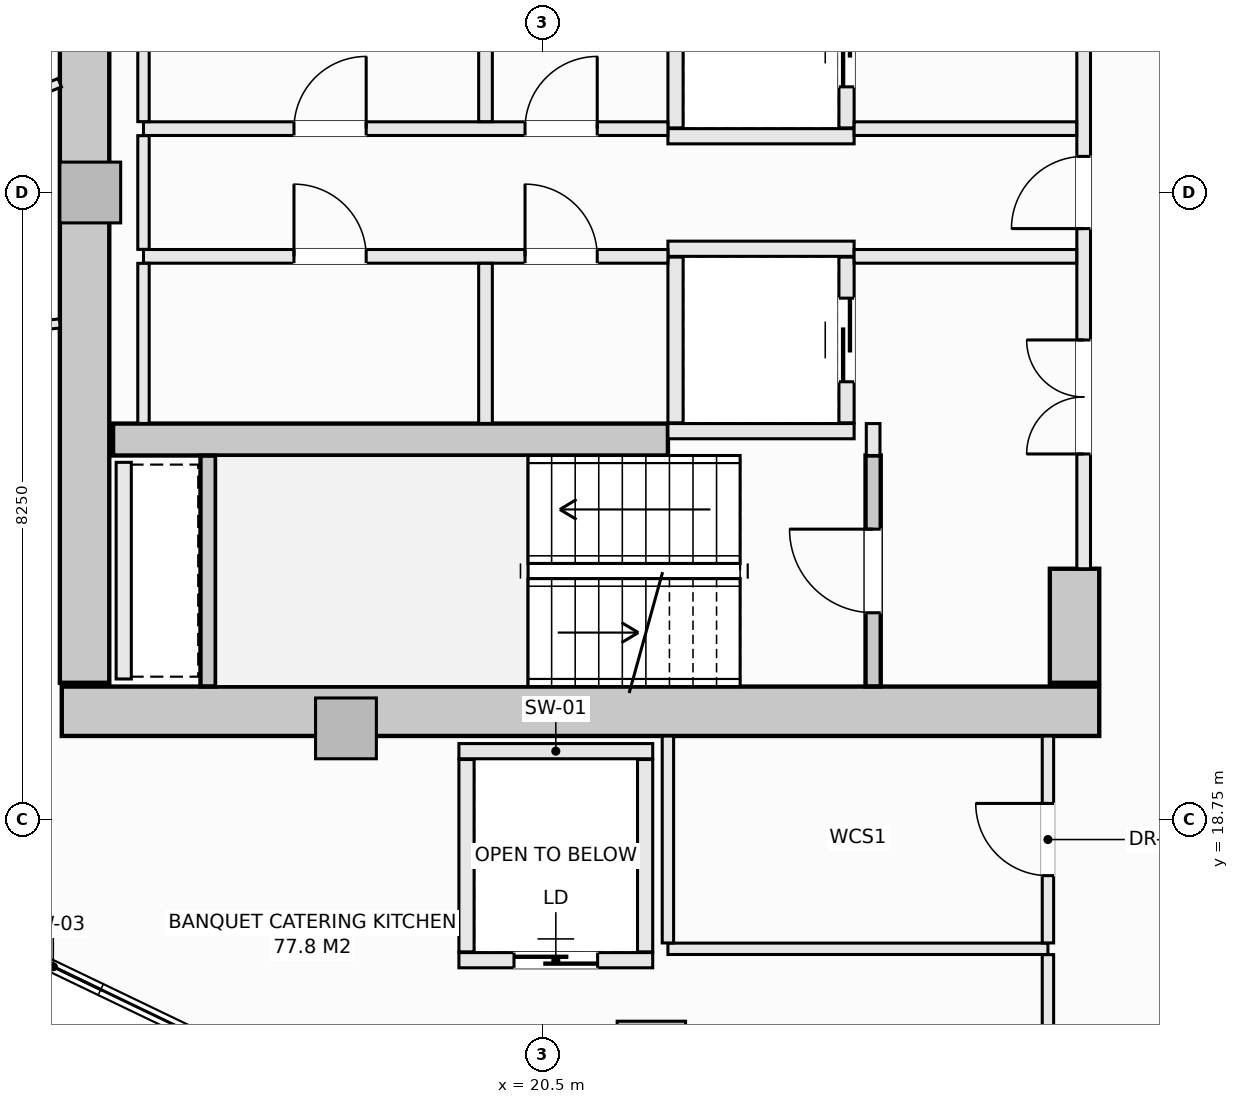
"""IFC4 building model, lengths in metres.
Left out: names, types, materials, properties, quantities, classifications, styles, units other than length and angle.
Written with IfcOpenShell. Run it as: python <this file> out.ifc"""

import sys

from ifc_helpers import new_model, si_unit, direction, frame, frame_2d, origin, origin_2d, place, context, subcontext, project, spatial, rectangle, extrude, element, fill, save


model = new_model("IFC4")
c1 = context("Model", 3, precision=1e-05, world=origin(), true_north=direction((0.0, 1.0)))
c2 = subcontext(c1, "Body", "Model", "MODEL_VIEW")
j1 = project(units=[si_unit("LENGTHUNIT", "METRE"), si_unit("PLANEANGLEUNIT", "RADIAN")], contexts=[c1])
p1 = place(None, origin())
s1 = spatial("IfcSite", under=j1, at=p1, CompositionType="ELEMENT")
p2 = place(p1, origin())
s2 = spatial("IfcBuilding", under=s1, at=p2, CompositionType="ELEMENT")
p3 = place(p2, frame((0.0, 0.0, 149.5)))
s3 = spatial("IfcBuildingStorey", under=s2, at=p3, CompositionType="ELEMENT", Elevation=149.5)
p4 = place(p3, frame((14.175, 20.175, -0.27), z_axis=(0.0, 0.0, 1.0), x_axis=(1.0, 0.0, 0.0)))
e1 = element("IfcWall", 1, at=p4, inside=s3, PredefinedType="SHEAR", context=c2, shape_type="SweptSolid", body=[
    extrude(rectangle(XDim=13.65, YDim=0.65, at=frame_2d((6.825, 0.0))), origin(), (0.0, 0.0, 1.0), 3.4),
])
p5 = place(p3, frame((14.475, 20.55, -0.27), z_axis=(0.0, 0.0, 1.0), x_axis=(0.0, 1.0, 0.0)))
e2 = element("IfcWall", 2, at=p5, inside=s3, PredefinedType="SHEAR", context=c2, shape_type="SweptSolid", body=[
    extrude(rectangle(XDim=12.9, YDim=0.65, at=frame_2d((6.45, 0.0))), origin(), (0.0, 0.0, 1.0), 3.4),
])
p6 = place(p3, frame((27.5, 20.55, -0.27), z_axis=(0.0, 0.0, 1.0), x_axis=(0.0, 1.0, 0.0)))
e3 = element("IfcWall", 3, at=p6, inside=s3, PredefinedType="SHEAR", context=c2, shape_type="SweptSolid", body=[
    extrude(rectangle(XDim=1.5, YDim=0.65, at=frame_2d((0.75, 0.0))), origin(), (0.0, 0.0, 1.0), 3.4),
])
p7 = place(p3, frame((14.85, 23.75, -0.27), z_axis=(0.0, 0.0, 1.0), x_axis=(1.0, 0.0, 0.0)))
e4 = element("IfcWall", 4, at=p7, inside=s3, PredefinedType="SHEAR", context=c2, shape_type="SweptSolid", body=[
    extrude(rectangle(XDim=7.3, YDim=0.42, at=frame_2d((3.65, 0.0))), origin(), (0.0, 0.0, 1.0), 3.4),
])
p8 = place(p3, frame((21.932, 15.648, -0.27), z_axis=(0.0, 0.0, 1.0), x_axis=(1.0, 0.0, 0.0)))
e5 = element("IfcColumn", 5, at=p8, inside=s3, PredefinedType="COLUMN", context=c2, shape_type="SweptSolid", body=[
    extrude(rectangle(XDim=0.9, YDim=0.9, at=origin_2d()), origin(), (0.0, 0.0, 1.0), 3.4),
])
for number, where, z_axis, x_axis in (
    (6, (14.55, 27.0, -0.27), (0.0, 0.0, 1.0), (1.0, 0.0, 0.0)),
    (7, (17.914, 19.95, -0.27), (0.0, 0.0, 1.0), (1.0, 0.0, 0.0)),
):
    element("IfcColumn", number, at=place(p3, frame(where, z_axis=z_axis, x_axis=x_axis)), inside=s3, PredefinedType="PILASTER", context=c2, shape_type="SweptSolid", body=[
        extrude(rectangle(XDim=0.8, YDim=0.8, at=origin_2d()), origin(), (0.0, 0.0, 1.0), 3.4),
    ])
p9 = place(p3, frame((24.85, 20.502, -0.27), z_axis=(0.0, 0.0, 1.0), x_axis=(0.0, 1.0, 0.0)))
e8 = element("IfcWall", 8, at=p9, inside=s3, PredefinedType="SHEAR", context=c2, shape_type="SweptSolid", body=[
    extrude(rectangle(XDim=3.038, YDim=0.2, at=frame_2d((1.519, 0.0))), origin(), (0.0, 0.0, 1.0), 3.4),
])
p10 = place(p9, frame((0.969, 0.0, 0.27)))
e9 = element("IfcOpeningElement", 9, at=p10, cuts=e8, PredefinedType="OPENING", context=c2, shape_type="SweptSolid", body=[
    extrude(rectangle(XDim=1.1, YDim=2.15, at=frame_2d((0.55, 1.075))), frame((0.0, 0.11, 0.0), z_axis=(0.0, -1.0, 0.0), x_axis=(1.0, 0.0, 0.0)), (0.0, 0.0, 1.0), 0.22),
])
p11 = place(p3, frame((16.1, 20.502, -0.27), z_axis=(0.0, 0.0, 1.0), x_axis=(0.0, 1.0, 0.0)))
e10 = element("IfcWall", 10, at=p11, inside=s3, PredefinedType="SHEAR", context=c2, shape_type="SweptSolid", body=[
    extrude(rectangle(XDim=3.036, YDim=0.2, at=frame_2d((1.518, 0.0))), origin(), (0.0, 0.0, 1.0), 3.4),
])
p12 = place(p3, frame((22.15, 27.74, 0.0), z_axis=(0.0, 0.0, 1.0), x_axis=(1.0, 0.0, 0.0)))
e11 = element("IfcWall", 11, at=p12, inside=s3, PredefinedType="SOLIDWALL", context=c2, shape_type="SweptSolid", body=[
    extrude(rectangle(XDim=2.45, YDim=0.2, at=frame_2d((1.225, 0.0))), origin(), (0.0, 0.0, 1.0), 3.13),
])
p13 = place(p3, frame((22.25, 27.85, 0.0), z_axis=(0.0, 0.0, 1.0), x_axis=(0.0, 1.0, 0.0)))
e12 = element("IfcWall", 12, at=p13, inside=s3, PredefinedType="SOLIDWALL", context=c2, shape_type="SweptSolid", body=[
    extrude(rectangle(XDim=2.18, YDim=0.2, at=frame_2d((1.09, 0.0))), origin(), (0.0, 0.0, 1.0), 3.13),
])
p14 = place(p3, frame((24.5, 27.85, 0.0), z_axis=(0.0, 0.0, 1.0), x_axis=(0.0, 1.0, 0.0)))
e13 = element("IfcWall", 13, at=p14, inside=s3, PredefinedType="SOLIDWALL", context=c2, shape_type="SweptSolid", body=[
    extrude(rectangle(XDim=2.18, YDim=0.2, at=frame_2d((1.09, 0.0))), origin(), (0.0, 0.0, 1.0), 3.13),
])
p15 = place(p14, frame((0.54, 0.0, 0.0)))
e14 = element("IfcOpeningElement", 14, at=p15, cuts=e13, PredefinedType="OPENING", context=c2, shape_type="SweptSolid", body=[
    extrude(rectangle(XDim=1.1, YDim=2.2, at=frame_2d((0.55, 1.1))), frame((0.0, 0.11, 0.0), z_axis=(0.0, -1.0, 0.0), x_axis=(1.0, 0.0, 0.0)), (0.0, 0.0, 1.0), 0.22),
])
for number, where, z_axis, x_axis in (
    (15, (22.15, 26.26, 0.0), (0.0, 0.0, 1.0), (1.0, 0.0, 0.0)),
    (16, (22.15, 23.86, 0.0), (0.0, 0.0, 1.0), (1.0, 0.0, 0.0)),
):
    element("IfcWall", number, at=place(p3, frame(where, z_axis=z_axis, x_axis=x_axis)), inside=s3, PredefinedType="SOLIDWALL", context=c2, shape_type="SweptSolid", body=[
        extrude(rectangle(XDim=2.45, YDim=0.2, at=frame_2d((1.225, 0.0))), origin(), (0.0, 0.0, 1.0), 3.13),
    ])
p16 = place(p3, frame((22.25, 23.97, 0.0), z_axis=(0.0, 0.0, 1.0), x_axis=(0.0, 1.0, 0.0)))
e17 = element("IfcWall", 17, at=p16, inside=s3, PredefinedType="SOLIDWALL", context=c2, shape_type="SweptSolid", body=[
    extrude(rectangle(XDim=2.18, YDim=0.2, at=frame_2d((1.09, 0.0))), origin(), (0.0, 0.0, 1.0), 3.13),
])
p17 = place(p3, frame((24.5, 23.97, 0.0), z_axis=(0.0, 0.0, 1.0), x_axis=(0.0, 1.0, 0.0)))
e18 = element("IfcWall", 18, at=p17, inside=s3, PredefinedType="SOLIDWALL", context=c2, shape_type="SweptSolid", body=[
    extrude(rectangle(XDim=2.18, YDim=0.2, at=frame_2d((1.09, 0.0))), origin(), (0.0, 0.0, 1.0), 3.13),
])
p18 = place(p17, frame((0.54, 0.0, 0.0)))
e19 = element("IfcOpeningElement", 19, at=p18, cuts=e18, PredefinedType="OPENING", context=c2, shape_type="SweptSolid", body=[
    extrude(rectangle(XDim=1.1, YDim=2.2, at=frame_2d((0.55, 1.1))), frame((0.0, 0.11, 0.0), z_axis=(0.0, -1.0, 0.0), x_axis=(1.0, 0.0, 0.0)), (0.0, 0.0, 1.0), 0.22),
])
p19 = place(p3, frame((19.4, 19.65, 0.0), z_axis=(0.0, 0.0, 1.0), x_axis=(1.0, 0.0, 0.0)))
e20 = element("IfcWall", 20, at=p19, inside=s3, PredefinedType="SOLIDWALL", context=c2, shape_type="SweptSolid", body=[
    extrude(rectangle(XDim=2.55, YDim=0.2, at=frame_2d((1.275, 0.0))), origin(), (0.0, 0.0, 1.0), 3.13),
])
p20 = place(p3, frame((19.4, 16.9, 0.0), z_axis=(0.0, 0.0, 1.0), x_axis=(1.0, 0.0, 0.0)))
e21 = element("IfcWall", 21, at=p20, inside=s3, PredefinedType="SOLIDWALL", context=c2, shape_type="SweptSolid", body=[
    extrude(rectangle(XDim=2.55, YDim=0.2, at=frame_2d((1.275, 0.0))), origin(), (0.0, 0.0, 1.0), 3.13),
])
p21 = place(p20, frame((0.725, 0.0, 0.0)))
e22 = element("IfcOpeningElement", 22, at=p21, cuts=e21, PredefinedType="OPENING", context=c2, shape_type="SweptSolid", body=[
    extrude(rectangle(XDim=1.1, YDim=2.2, at=frame_2d((0.55, 1.1))), frame((0.0, 0.11, 0.0), z_axis=(0.0, -1.0, 0.0), x_axis=(1.0, 0.0, 0.0)), (0.0, 0.0, 1.0), 0.22),
])
for number, where, z_axis, x_axis in (
    (23, (19.5, 17.01, 0.0), (0.0, 0.0, 1.0), (0.0, 1.0, 0.0)),
    (24, (21.85, 17.01, 0.0), (0.0, 0.0, 1.0), (0.0, 1.0, 0.0)),
):
    element("IfcWall", number, at=place(p3, frame(where, z_axis=z_axis, x_axis=x_axis)), inside=s3, PredefinedType="SOLIDWALL", context=c2, shape_type="SweptSolid", body=[
        extrude(rectangle(XDim=2.53, YDim=0.2, at=frame_2d((1.265, 0.0))), origin(), (0.0, 0.0, 1.0), 3.13),
    ])
p22 = place(p3, frame((14.99, 20.6, 0.0), z_axis=(0.0, 0.0, 1.0), x_axis=(0.0, 1.0, 0.0)))
e25 = element("IfcWall", 25, at=p22, inside=s3, PredefinedType="SOLIDWALL", context=c2, shape_type="SweptSolid", body=[
    extrude(rectangle(XDim=2.85, YDim=0.2, at=frame_2d((1.425, 0.0))), origin(), (0.0, 0.0, 1.0), 3.13),
])
p23 = place(p3, frame((24.85, 23.54, 0.0), z_axis=(0.0, 0.0, 1.0), x_axis=(0.0, 1.0, 0.0)))
e26 = element("IfcWall", 26, at=p23, inside=s3, PredefinedType="SOLIDWALL", context=c2, shape_type="SweptSolid", body=[
    extrude(rectangle(XDim=0.42, YDim=0.18, at=frame_2d((0.21, 0.0))), origin(), (0.0, 0.0, 1.0), 3.13),
])
p24 = place(p3, frame((27.62, 22.05, 0.0), z_axis=(0.0, 0.0, 1.0), x_axis=(0.0, 1.0, 0.0)))
e27 = element("IfcWall", 27, at=p24, inside=s3, PredefinedType="SOLIDWALL", context=c2, shape_type="SweptSolid", body=[
    extrude(rectangle(XDim=9.9, YDim=0.18, at=frame_2d((4.95, 0.0))), origin(), (0.0, 0.0, 1.0), 3.13),
])
p25 = place(p24, frame((4.475, 0.0, 0.0)))
e28 = element("IfcOpeningElement", 28, at=p25, cuts=e27, PredefinedType="OPENING", context=c2, shape_type="SweptSolid", body=[
    extrude(rectangle(XDim=0.95, YDim=2.1, at=frame_2d((0.475, 1.05))), frame((0.0, 0.1, 0.0), z_axis=(0.0, -1.0, 0.0), x_axis=(1.0, 0.0, 0.0)), (0.0, 0.0, 1.0), 0.2),
])
p26 = place(p24, frame((6.89, 0.0, 0.0)))
e29 = element("IfcOpeningElement", 29, at=p26, cuts=e27, PredefinedType="OPENING", context=c2, shape_type="SweptSolid", body=[
    extrude(rectangle(XDim=1.5, YDim=2.2, at=frame_2d((0.75, 1.1))), frame((0.0, 0.1, 0.0), z_axis=(0.0, -1.0, 0.0), x_axis=(1.0, 0.0, 0.0)), (0.0, 0.0, 1.0), 0.2),
])
p27 = place(p24, frame((1.51, 0.0, 0.0)))
e30 = element("IfcOpeningElement", 30, at=p27, cuts=e27, PredefinedType="OPENING", context=c2, shape_type="SweptSolid", body=[
    extrude(rectangle(XDim=1.5, YDim=2.2, at=frame_2d((0.75, 1.1))), frame((0.0, 0.1, 0.0), z_axis=(0.0, -1.0, 0.0), x_axis=(1.0, 0.0, 0.0)), (0.0, 0.0, 1.0), 0.2),
])
p28 = place(p3, frame((15.25, 27.84, 0.0), z_axis=(0.0, 0.0, 1.0), x_axis=(1.0, 0.0, 0.0)))
e31 = element("IfcWall", 31, at=p28, inside=s3, PredefinedType="SOLIDWALL", context=c2, shape_type="SweptSolid", body=[
    extrude(rectangle(XDim=6.9, YDim=0.18, at=frame_2d((3.45, 0.0))), origin(), (0.0, 0.0, 1.0), 3.13),
])
p29 = place(p28, frame((5.02, 0.0, 0.0)))
e32 = element("IfcOpeningElement", 32, at=p29, cuts=e31, PredefinedType="OPENING", context=c2, shape_type="SweptSolid", body=[
    extrude(rectangle(XDim=0.95, YDim=2.1, at=frame_2d((0.475, 1.05))), frame((0.0, 0.1, 0.0), z_axis=(0.0, -1.0, 0.0), x_axis=(1.0, 0.0, 0.0)), (0.0, 0.0, 1.0), 0.2),
])
p30 = place(p28, frame((1.98, 0.0, 0.0)))
e33 = element("IfcOpeningElement", 33, at=p30, cuts=e31, PredefinedType="OPENING", context=c2, shape_type="SweptSolid", body=[
    extrude(rectangle(XDim=0.95, YDim=2.1, at=frame_2d((0.475, 1.05))), frame((0.0, 0.1, 0.0), z_axis=(0.0, -1.0, 0.0), x_axis=(1.0, 0.0, 0.0)), (0.0, 0.0, 1.0), 0.2),
])
p31 = place(p3, frame((24.6, 27.84, 0.0), z_axis=(0.0, 0.0, 1.0), x_axis=(1.0, 0.0, 0.0)))
e34 = element("IfcWall", 34, at=p31, inside=s3, PredefinedType="SOLIDWALL", context=c2, shape_type="SweptSolid", body=[
    extrude(rectangle(XDim=2.928, YDim=0.18, at=frame_2d((1.464, 0.0))), origin(), (0.0, 0.0, 1.0), 3.13),
])
p32 = place(p3, frame((15.25, 26.16, 0.0), z_axis=(0.0, 0.0, 1.0), x_axis=(1.0, 0.0, 0.0)))
e35 = element("IfcWall", 35, at=p32, inside=s3, PredefinedType="SOLIDWALL", context=c2, shape_type="SweptSolid", body=[
    extrude(rectangle(XDim=6.9, YDim=0.18, at=frame_2d((3.45, 0.0))), origin(), (0.0, 0.0, 1.0), 3.13),
])
p33 = place(p32, frame((5.02, 0.0, 0.0)))
e36 = element("IfcOpeningElement", 36, at=p33, cuts=e35, PredefinedType="OPENING", context=c2, shape_type="SweptSolid", body=[
    extrude(rectangle(XDim=0.95, YDim=2.1, at=frame_2d((0.475, 1.05))), frame((0.0, 0.1, 0.0), z_axis=(0.0, -1.0, 0.0), x_axis=(1.0, 0.0, 0.0)), (0.0, 0.0, 1.0), 0.2),
])
p34 = place(p32, frame((1.98, 0.0, 0.0)))
e37 = element("IfcOpeningElement", 37, at=p34, cuts=e35, PredefinedType="OPENING", context=c2, shape_type="SweptSolid", body=[
    extrude(rectangle(XDim=0.95, YDim=2.1, at=frame_2d((0.475, 1.05))), frame((0.0, 0.1, 0.0), z_axis=(0.0, -1.0, 0.0), x_axis=(1.0, 0.0, 0.0)), (0.0, 0.0, 1.0), 0.2),
])
p35 = place(p3, frame((24.6, 26.16, 0.0), z_axis=(0.0, 0.0, 1.0), x_axis=(1.0, 0.0, 0.0)))
e38 = element("IfcWall", 38, at=p35, inside=s3, PredefinedType="SOLIDWALL", context=c2, shape_type="SweptSolid", body=[
    extrude(rectangle(XDim=2.928, YDim=0.18, at=frame_2d((1.464, 0.0))), origin(), (0.0, 0.0, 1.0), 3.13),
])
p36 = place(p3, frame((15.25, 23.962, 0.0), z_axis=(0.0, 0.0, 1.0), x_axis=(0.0, 1.0, 0.0)))
e39 = element("IfcWall", 39, at=p36, inside=s3, PredefinedType="PARTITIONING", context=c2, shape_type="SweptSolid", body=[
    extrude(rectangle(XDim=2.106, YDim=0.15, at=frame_2d((1.053, 0.0))), origin(), (0.0, 0.0, 1.0), 3.13),
])
p37 = place(p3, frame((15.25, 26.252, 0.0), z_axis=(0.0, 0.0, 1.0), x_axis=(0.0, 1.0, 0.0)))
e40 = element("IfcWall", 40, at=p37, inside=s3, PredefinedType="PARTITIONING", context=c2, shape_type="SweptSolid", body=[
    extrude(rectangle(XDim=1.496, YDim=0.15, at=frame_2d((0.748, 0.0))), origin(), (0.0, 0.0, 1.0), 3.13),
])
p38 = place(p3, frame((15.25, 27.932, 0.0), z_axis=(0.0, 0.0, 1.0), x_axis=(0.0, 1.0, 0.0)))
e41 = element("IfcWall", 41, at=p38, inside=s3, PredefinedType="PARTITIONING", context=c2, shape_type="SweptSolid", body=[
    extrude(rectangle(XDim=2.106, YDim=0.15, at=frame_2d((1.053, 0.0))), origin(), (0.0, 0.0, 1.0), 3.13),
])
for number, where, z_axis, x_axis in (
    (42, (19.75, 23.962, 0.0), (0.0, 0.0, 1.0), (0.0, 1.0, 0.0)),
    (43, (19.75, 27.932, 0.0), (0.0, 0.0, 1.0), (0.0, 1.0, 0.0)),
):
    element("IfcWall", number, at=place(p3, frame(where, z_axis=z_axis, x_axis=x_axis)), inside=s3, PredefinedType="SOLIDWALL", context=c2, shape_type="SweptSolid", body=[
        extrude(rectangle(XDim=2.106, YDim=0.18, at=frame_2d((1.053, 0.0))), origin(), (0.0, 0.0, 1.0), 3.13),
    ])
p39 = place(p3, frame((22.15, 17.05, 0.0), z_axis=(0.0, 0.0, 1.0), x_axis=(1.0, 0.0, 0.0)))
e44 = element("IfcWall", 44, at=p39, inside=s3, PredefinedType="PARTITIONING", context=c2, shape_type="SweptSolid", body=[
    extrude(rectangle(XDim=5.0, YDim=0.15, at=frame_2d((2.5, 0.0))), origin(), (0.0, 0.0, 1.0), 3.13),
])
p40 = place(p3, frame((22.15, 17.127, 0.0), z_axis=(0.0, 0.0, 1.0), x_axis=(0.0, 1.0, 0.0)))
e45 = element("IfcWall", 45, at=p40, inside=s3, PredefinedType="PARTITIONING", context=c2, shape_type="SweptSolid", body=[
    extrude(rectangle(XDim=2.721, YDim=0.15, at=frame_2d((1.36, 0.0))), origin(), (0.0, 0.0, 1.0), 3.13),
])
p41 = place(p3, frame((27.15, 12.056, 0.0), z_axis=(0.0, 0.0, 1.0), x_axis=(0.0, 1.0, 0.0)))
e46 = element("IfcWall", 46, at=p41, inside=s3, PredefinedType="PARTITIONING", context=c2, shape_type="SweptSolid", body=[
    extrude(rectangle(XDim=4.917, YDim=0.15, at=frame_2d((2.458, 0.0))), origin(), (0.0, 0.0, 1.0), 3.13),
])
p42 = place(p41, frame((2.948, 0.0, 0.0)))
e47 = element("IfcOpeningElement", 47, at=p42, cuts=e46, PredefinedType="OPENING", context=c2, shape_type="SweptSolid", body=[
    extrude(rectangle(XDim=0.95, YDim=2.1, at=frame_2d((0.475, 1.05))), frame((0.0, 0.085, 0.0), z_axis=(0.0, -1.0, 0.0), x_axis=(1.0, 0.0, 0.0)), (0.0, 0.0, 1.0), 0.17),
])
p43 = place(p3, frame((27.15, 17.127, 0.0), z_axis=(0.0, 0.0, 1.0), x_axis=(0.0, 1.0, 0.0)))
e48 = element("IfcWall", 48, at=p43, inside=s3, PredefinedType="PARTITIONING", context=c2, shape_type="SweptSolid", body=[
    extrude(rectangle(XDim=2.721, YDim=0.15, at=frame_2d((1.36, 0.0))), origin(), (0.0, 0.0, 1.0), 3.13),
])
p44 = place(p43, frame((0.885, 0.0, 0.0)))
e49 = element("IfcOpeningElement", 49, at=p44, cuts=e48, PredefinedType="OPENING", context=c2, shape_type="SweptSolid", body=[
    extrude(rectangle(XDim=0.95, YDim=2.1, at=frame_2d((0.475, 1.05))), frame((0.0, 0.085, 0.0), z_axis=(0.0, -1.0, 0.0), x_axis=(1.0, 0.0, 0.0)), (0.0, 0.0, 1.0), 0.17),
])
p45 = place(p3, frame((8.714, 24.735, 0.0), z_axis=(0.0, 0.0, 1.0), x_axis=(0.995066803819, 0.099207136527, 0.0)))
e50 = element("IfcWall", 50, at=p45, inside=s3, PredefinedType="PARTITIONING", context=c2, shape_type="SweptSolid", body=[
    extrude(rectangle(XDim=5.461, YDim=0.12, at=frame_2d((2.73, 0.0))), origin(), (0.0, 0.0, 1.0), 3.13),
])
p46 = place(p3, frame((8.479, 26.162, 0.0), z_axis=(0.0, 0.0, 1.0), x_axis=(0.927622844305, 0.373518217392, 0.0)))
e51 = element("IfcWall", 51, at=p46, inside=s3, PredefinedType="PARTITIONING", context=c2, shape_type="SweptSolid", body=[
    extrude(rectangle(XDim=6.111, YDim=0.12, at=frame_2d((3.055, 0.0))), origin(), (0.0, 0.0, 1.0), 2.505),
])
p47 = place(p10, origin())
e52 = element("IfcDoor", 52, at=p47, inside=s3, OperationType="SINGLE_SWING_RIGHT", PredefinedType="DOOR", context=c2, shape_type="SweptSolid", body=[
    extrude(rectangle(XDim=1.1, YDim=2.15, at=frame_2d((0.55, 1.075))), frame((0.0, 0.025, 0.0), z_axis=(0.0, -1.0, 0.0), x_axis=(1.0, 0.0, 0.0)), (0.0, 0.0, 1.0), 0.05),
])
fill(e9, e52)
p48 = place(p15, origin())
e53 = element("IfcDoor", 53, at=p48, inside=s3, OperationType="SLIDING_TO_LEFT", PredefinedType="DOOR", context=c2, shape_type="SweptSolid", body=[
    extrude(rectangle(XDim=1.1, YDim=2.2, at=frame_2d((0.55, 1.1))), frame((0.0, 0.025, 0.0), z_axis=(0.0, -1.0, 0.0), x_axis=(1.0, 0.0, 0.0)), (0.0, 0.0, 1.0), 0.05),
])
fill(e14, e53)
p49 = place(p18, origin())
e54 = element("IfcDoor", 54, at=p49, inside=s3, OperationType="SLIDING_TO_LEFT", PredefinedType="DOOR", context=c2, shape_type="SweptSolid", body=[
    extrude(rectangle(XDim=1.1, YDim=2.2, at=frame_2d((0.55, 1.1))), frame((0.0, 0.025, 0.0), z_axis=(0.0, -1.0, 0.0), x_axis=(1.0, 0.0, 0.0)), (0.0, 0.0, 1.0), 0.05),
])
fill(e19, e54)
p50 = place(p21, origin())
e55 = element("IfcDoor", 55, at=p50, inside=s3, OperationType="SLIDING_TO_LEFT", PredefinedType="DOOR", context=c2, shape_type="SweptSolid", body=[
    extrude(rectangle(XDim=1.1, YDim=2.2, at=frame_2d((0.55, 1.1))), frame((0.0, 0.025, 0.0), z_axis=(0.0, -1.0, 0.0), x_axis=(1.0, 0.0, 0.0)), (0.0, 0.0, 1.0), 0.05),
])
fill(e22, e55)
p51 = place(p25, origin())
e56 = element("IfcDoor", 56, at=p51, inside=s3, OperationType="SINGLE_SWING_LEFT", PredefinedType="DOOR", context=c2, shape_type="SweptSolid", body=[
    extrude(rectangle(XDim=0.95, YDim=2.1, at=frame_2d((0.475, 1.05))), frame((0.0, 0.025, 0.0), z_axis=(0.0, -1.0, 0.0), x_axis=(1.0, 0.0, 0.0)), (0.0, 0.0, 1.0), 0.05),
])
fill(e28, e56)
p52 = place(p27, origin())
e57 = element("IfcDoor", 57, at=p52, inside=s3, OperationType="DOUBLE_DOOR_SINGLE_SWING", PredefinedType="DOOR", context=c2, shape_type="SweptSolid", body=[
    extrude(rectangle(XDim=1.5, YDim=2.2, at=frame_2d((0.75, 1.1))), frame((0.0, 0.025, 0.0), z_axis=(0.0, -1.0, 0.0), x_axis=(1.0, 0.0, 0.0)), (0.0, 0.0, 1.0), 0.05),
])
fill(e30, e57)
p53 = place(p29, origin())
e58 = element("IfcDoor", 58, at=p53, inside=s3, OperationType="SINGLE_SWING_RIGHT", PredefinedType="DOOR", context=c2, shape_type="SweptSolid", body=[
    extrude(rectangle(XDim=0.95, YDim=2.1, at=frame_2d((0.475, 1.05))), frame((0.0, 0.025, 0.0), z_axis=(0.0, -1.0, 0.0), x_axis=(1.0, 0.0, 0.0)), (0.0, 0.0, 1.0), 0.05),
])
fill(e32, e58)
p54 = place(p33, origin())
e59 = element("IfcDoor", 59, at=p54, inside=s3, OperationType="SINGLE_SWING_LEFT", PredefinedType="DOOR", context=c2, shape_type="SweptSolid", body=[
    extrude(rectangle(XDim=0.95, YDim=2.1, at=frame_2d((0.475, 1.05))), frame((0.0, 0.025, 0.0), z_axis=(0.0, -1.0, 0.0), x_axis=(1.0, 0.0, 0.0)), (0.0, 0.0, 1.0), 0.05),
])
fill(e36, e59)
p55 = place(p30, origin())
e60 = element("IfcDoor", 60, at=p55, inside=s3, OperationType="SINGLE_SWING_RIGHT", PredefinedType="DOOR", context=c2, shape_type="SweptSolid", body=[
    extrude(rectangle(XDim=0.95, YDim=2.1, at=frame_2d((0.475, 1.05))), frame((0.0, 0.025, 0.0), z_axis=(0.0, -1.0, 0.0), x_axis=(1.0, 0.0, 0.0)), (0.0, 0.0, 1.0), 0.05),
])
fill(e33, e60)
p56 = place(p34, origin())
e61 = element("IfcDoor", 61, at=p56, inside=s3, OperationType="SINGLE_SWING_LEFT", PredefinedType="DOOR", context=c2, shape_type="SweptSolid", body=[
    extrude(rectangle(XDim=0.95, YDim=2.1, at=frame_2d((0.475, 1.05))), frame((0.0, 0.025, 0.0), z_axis=(0.0, -1.0, 0.0), x_axis=(1.0, 0.0, 0.0)), (0.0, 0.0, 1.0), 0.05),
])
fill(e37, e61)
p57 = place(p44, origin())
e62 = element("IfcDoor", 62, at=p57, inside=s3, OperationType="SINGLE_SWING_RIGHT", PredefinedType="DOOR", context=c2, shape_type="SweptSolid", body=[
    extrude(rectangle(XDim=0.95, YDim=2.1, at=frame_2d((0.475, 1.05))), frame((0.0, 0.025, 0.0), z_axis=(0.0, -1.0, 0.0), x_axis=(1.0, 0.0, 0.0)), (0.0, 0.0, 1.0), 0.05),
])
fill(e49, e62)
save(model, sys.argv[1])
